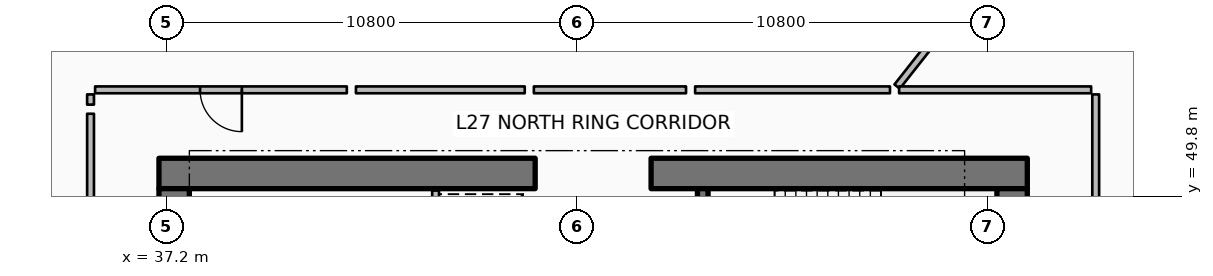
"""IFC4 building model, lengths in metres.
Left out: names, types, materials, properties, quantities, classifications, styles, units other than length and angle.
Written with IfcOpenShell. Run it as: python <this file> out.ifc"""

import sys

from ifc_helpers import new_model, si_unit, direction, frame, frame_2d, origin, place, context, subcontext, project, spatial, rectangle, extrude, element, fill, save


model = new_model("IFC4")
c1 = context("Model", 3, precision=1e-05, world=origin(), true_north=direction((0.0, 1.0)))
c2 = subcontext(c1, "Body", "Model", "MODEL_VIEW")
j1 = project(units=[si_unit("LENGTHUNIT", "METRE"), si_unit("PLANEANGLEUNIT", "RADIAN")], contexts=[c1])
p1 = place(None, origin())
s1 = spatial("IfcSite", under=j1, at=p1, CompositionType="ELEMENT")
p2 = place(p1, origin())
s2 = spatial("IfcBuilding", under=s1, at=p2, CompositionType="ELEMENT")
p3 = place(p2, frame((0.0, 0.0, 108.9)))
s3 = spatial("IfcBuildingStorey", under=s2, at=p3, CompositionType="ELEMENT", Elevation=108.9)
p4 = place(p3, frame((37.0, 50.4, 0.0), z_axis=(0.0, 0.0, 1.0), x_axis=(1.0, 0.0, 0.0)))
e1 = element("IfcWall", 1, at=p4, inside=s3, PredefinedType="SHEAR", context=c2, shape_type="SweptSolid", body=[
    extrude(rectangle(XDim=9.9, YDim=0.8, at=frame_2d((4.95, 0.0))), origin(), (0.0, 0.0, 1.0), 3.75),
])
p5 = place(p3, frame((49.95, 50.4, 0.0), z_axis=(0.0, 0.0, 1.0), x_axis=(1.0, 0.0, 0.0)))
e2 = element("IfcWall", 2, at=p5, inside=s3, PredefinedType="SHEAR", context=c2, shape_type="SweptSolid", body=[
    extrude(rectangle(XDim=9.9, YDim=0.8, at=frame_2d((4.95, 0.0))), origin(), (0.0, 0.0, 1.0), 3.75),
])
for number, where, z_axis, x_axis in (
    (3, (37.4, 34.0, 0.0), (0.0, 0.0, 1.0), (0.0, 1.0, 0.0)),
    (4, (59.45, 34.0, 0.0), (0.0, 0.0, 1.0), (0.0, 1.0, 0.0)),
):
    element("IfcWall", number, at=place(p3, frame(where, z_axis=z_axis, x_axis=x_axis)), inside=s3, PredefinedType="SHEAR", context=c2, shape_type="SweptSolid", body=[
        extrude(rectangle(XDim=16.0, YDim=0.8, at=frame_2d((8.0, 0.0))), origin(), (0.0, 0.0, 1.0), 3.75),
    ])
p6 = place(p3, frame((51.31, 46.5, 0.0), z_axis=(0.0, 0.0, 1.0), x_axis=(0.0, 1.0, 0.0)))
e5 = element("IfcWall", 5, at=p6, inside=s3, PredefinedType="SHEAR", context=c2, shape_type="SweptSolid", body=[
    extrude(rectangle(XDim=3.5, YDim=0.28, at=frame_2d((1.75, 0.0))), origin(), (0.0, 0.0, 1.0), 3.75),
])
p7 = place(p3, frame((44.28, 47.82, 0.0), z_axis=(0.0, 0.0, 1.0), x_axis=(0.0, 1.0, 0.0)))
e6 = element("IfcWall", 6, at=p7, inside=s3, PredefinedType="PARTITIONING", context=c2, shape_type="SweptSolid", body=[
    extrude(rectangle(XDim=2.13, YDim=0.18, at=frame_2d((1.065, 0.0))), origin(), (0.0, 0.0, 1.0), 3.5),
])
p8 = place(p3, frame((56.425, 52.686, 0.0), z_axis=(0.0, 0.0, 1.0), x_axis=(0.619083417853, 0.785325233098, 0.0)))
e7 = element("IfcWall", 7, at=p8, inside=s3, PredefinedType="PARTITIONING", context=c2, shape_type="SweptSolid", body=[
    extrude(rectangle(XDim=15.063, YDim=0.18, at=frame_2d((7.532, 0.0))), origin(), (0.0, 0.0, 1.0), 2.94),
])
p9 = place(p3, frame((41.944, 52.6, 0.0), z_axis=(0.0, 0.0, 1.0), x_axis=(-1.0, 0.0, 0.0)))
e8 = element("IfcWall", 8, at=p9, inside=s3, PredefinedType="PARTITIONING", context=c2, shape_type="SweptSolid", body=[
    extrude(rectangle(XDim=6.624, YDim=0.18, at=frame_2d((3.312, 0.0))), origin(), (0.0, 0.0, 1.0), 2.94),
])
p10 = place(p9, frame((2.762, 0.0, 0.0)))
e9 = element("IfcOpeningElement", 9, at=p10, cuts=e8, PredefinedType="OPENING", context=c2, shape_type="SweptSolid", body=[
    extrude(rectangle(XDim=1.1, YDim=2.1, at=frame_2d((0.55, 1.05))), frame((0.0, 0.1, 0.0), z_axis=(0.0, -1.0, 0.0), x_axis=(1.0, 0.0, 0.0)), (0.0, 0.0, 1.0), 0.2),
])
p11 = place(p3, frame((35.2, 52.48, 0.0), z_axis=(0.0, 0.0, 1.0), x_axis=(0.0, -1.0, 0.0)))
e10 = element("IfcWall", 10, at=p11, inside=s3, PredefinedType="PARTITIONING", context=c2, shape_type="SweptSolid", body=[
    extrude(rectangle(XDim=0.269, YDim=0.18, at=frame_2d((0.135, 0.0))), origin(), (0.0, 0.0, 1.0), 2.94),
])
p12 = place(p3, frame((56.236, 52.6, 0.0), z_axis=(0.0, 0.0, 1.0), x_axis=(-1.0, 0.0, 0.0)))
e11 = element("IfcWall", 11, at=p12, inside=s3, PredefinedType="PARTITIONING", context=c2, shape_type="SweptSolid", body=[
    extrude(rectangle(XDim=5.127, YDim=0.18, at=frame_2d((2.563, 0.0))), origin(), (0.0, 0.0, 1.0), 2.94),
])
p13 = place(p3, frame((50.869, 52.6, 0.0), z_axis=(0.0, 0.0, 1.0), x_axis=(-1.0, 0.0, 0.0)))
e12 = element("IfcWall", 12, at=p13, inside=s3, PredefinedType="PARTITIONING", context=c2, shape_type="SweptSolid", body=[
    extrude(rectangle(XDim=4.004, YDim=0.18, at=frame_2d((2.002, 0.0))), origin(), (0.0, 0.0, 1.0), 2.94),
])
p14 = place(p3, frame((46.625, 52.6, 0.0), z_axis=(0.0, 0.0, 1.0), x_axis=(-1.0, 0.0, 0.0)))
e13 = element("IfcWall", 13, at=p14, inside=s3, PredefinedType="PARTITIONING", context=c2, shape_type="SweptSolid", body=[
    extrude(rectangle(XDim=4.442, YDim=0.18, at=frame_2d((2.221, 0.0))), origin(), (0.0, 0.0, 1.0), 2.94),
])
p15 = place(p3, frame((35.2, 51.971, 0.0), z_axis=(0.0, 0.0, 1.0), x_axis=(0.0, -1.0, 0.0)))
e14 = element("IfcWall", 14, at=p15, inside=s3, PredefinedType="PARTITIONING", context=c2, shape_type="SweptSolid", body=[
    extrude(rectangle(XDim=6.241, YDim=0.18, at=frame_2d((3.12, 0.0))), origin(), (0.0, 0.0, 1.0), 2.94),
])
p16 = place(p3, frame((61.65, 49.764, 0.0), z_axis=(0.0, 0.0, 1.0), x_axis=(0.0, 1.0, 0.0)))
e15 = element("IfcWall", 15, at=p16, inside=s3, PredefinedType="PARTITIONING", context=c2, shape_type="SweptSolid", body=[
    extrude(rectangle(XDim=2.716, YDim=0.18, at=frame_2d((1.358, 0.0))), origin(), (0.0, 0.0, 1.0), 2.94),
])
p17 = place(p3, frame((61.53, 52.6, 0.0), z_axis=(0.0, 0.0, 1.0), x_axis=(-1.0, 0.0, 0.0)))
e16 = element("IfcWall", 16, at=p17, inside=s3, PredefinedType="PARTITIONING", context=c2, shape_type="SweptSolid", body=[
    extrude(rectangle(XDim=5.054, YDim=0.18, at=frame_2d((2.527, 0.0))), origin(), (0.0, 0.0, 1.0), 2.94),
])
p18 = place(p10, origin())
e17 = element("IfcDoor", 17, at=p18, inside=s3, OperationType="SINGLE_SWING_LEFT", PredefinedType="DOOR", context=c2, shape_type="SweptSolid", body=[
    extrude(rectangle(XDim=1.1, YDim=2.1, at=frame_2d((0.55, 1.05))), frame((0.0, 0.025, 0.0), z_axis=(0.0, -1.0, 0.0), x_axis=(1.0, 0.0, 0.0)), (0.0, 0.0, 1.0), 0.05),
])
fill(e9, e17)
save(model, sys.argv[1])
